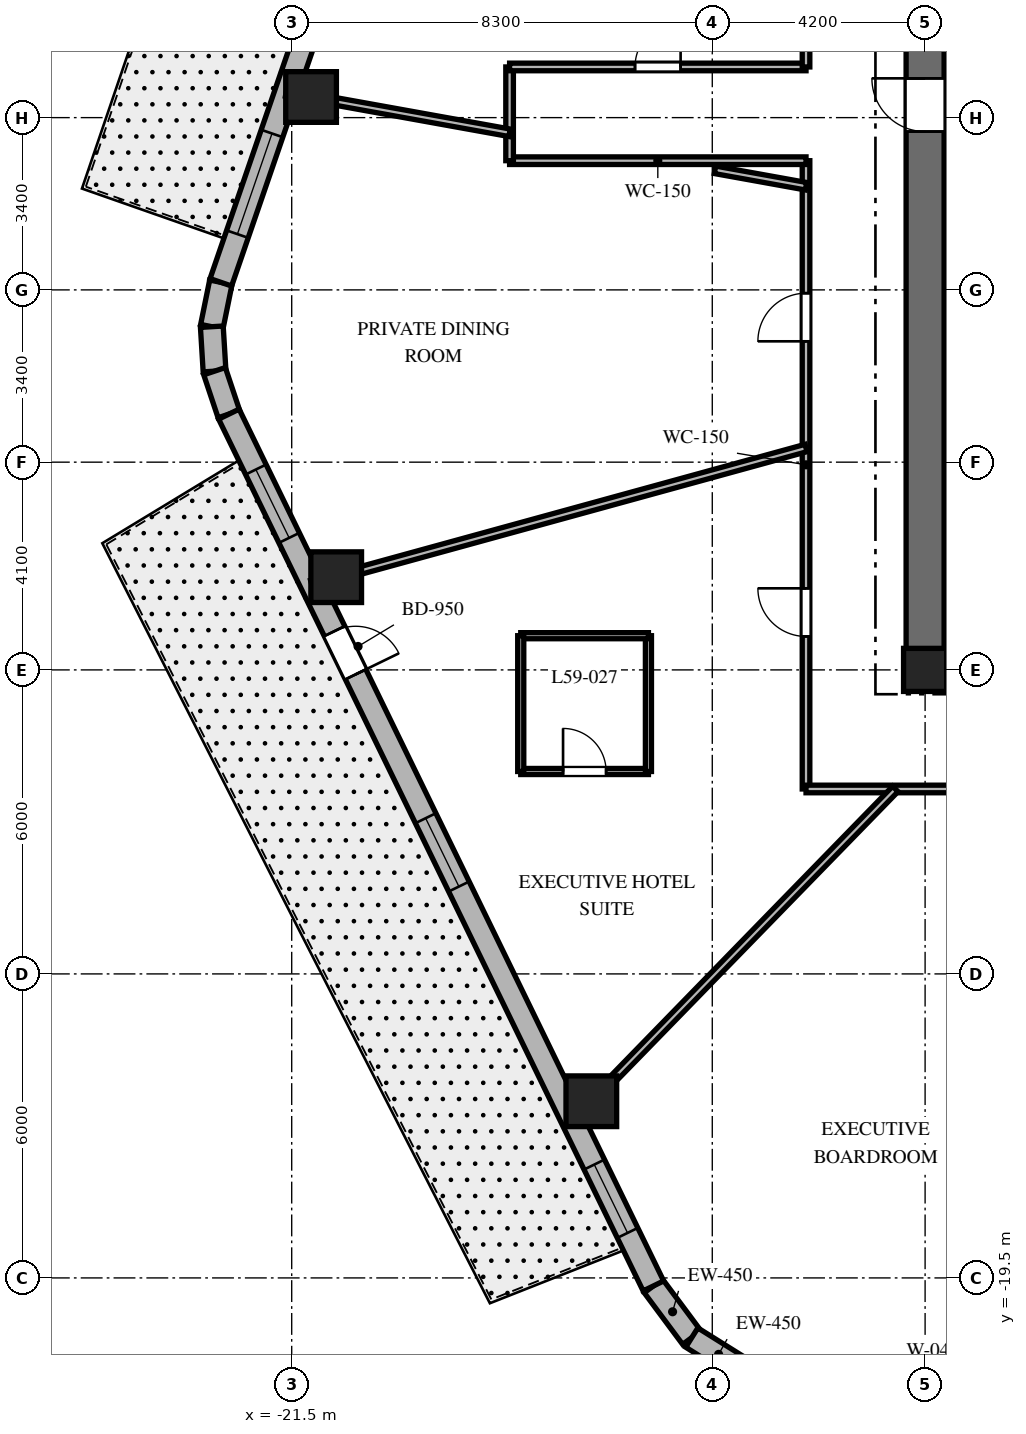
"""IFC4 building model, lengths in metres.
Left out: names, types, materials, properties, quantities, classifications, styles, units other than length and angle.
Written with IfcOpenShell. Run it as: python <this file> out.ifc"""

import sys

from ifc_helpers import new_model, si_unit, direction, frame, frame_2d, origin, origin_2d, place, context, subcontext, project, spatial, rectangle, extrude, element, fill, save


model = new_model("IFC4")
c1 = context("Model", 3, precision=1e-05, world=origin(), true_north=direction((0.0, 1.0)))
c2 = subcontext(c1, "Body", "Model", "MODEL_VIEW")
j1 = project(units=[si_unit("LENGTHUNIT", "METRE"), si_unit("PLANEANGLEUNIT", "RADIAN")], contexts=[c1])
p1 = place(None, origin())
s1 = spatial("IfcSite", under=j1, at=p1, CompositionType="ELEMENT")
p2 = place(p1, origin())
s2 = spatial("IfcBuilding", under=s1, at=p2, CompositionType="ELEMENT")
p3 = place(p2, frame((0.0, 0.0, 236.9)))
s3 = spatial("IfcBuildingStorey", under=s2, at=p3, CompositionType="ELEMENT", Elevation=236.9)
p4 = place(p3, frame((-9.375, -7.5, 0.0), z_axis=(0.0, 0.0, 1.0), x_axis=(1.0, 0.0, 0.0)))
e1 = element("IfcWall", 1, at=p4, inside=s3, PredefinedType="SHEAR", context=c2, shape_type="SweptSolid", body=[
    extrude(rectangle(XDim=18.75, YDim=0.75, at=frame_2d((9.375, 0.0))), origin(), (0.0, 0.0, 1.0), 3.8),
])
p5 = place(p4, frame((9.425, 0.0, 0.0)))
e2 = element("IfcOpeningElement", 2, at=p5, cuts=e1, PredefinedType="OPENING", context=c2, shape_type="SweptSolid", body=[
    extrude(rectangle(XDim=1.0, YDim=2.15, at=frame_2d((0.5, 1.075))), frame((0.0, 0.385, 0.0), z_axis=(0.0, -1.0, 0.0), x_axis=(1.0, 0.0, 0.0)), (0.0, 0.0, 1.0), 0.77),
])
p6 = place(p3, frame((-9.0, -7.125, 0.0), z_axis=(0.0, 0.0, 1.0), x_axis=(0.0, 1.0, 0.0)))
e3 = element("IfcWall", 3, at=p6, inside=s3, PredefinedType="SHEAR", context=c2, shape_type="SweptSolid", body=[
    extrude(rectangle(XDim=14.25, YDim=0.75, at=frame_2d((7.125, 0.0))), origin(), (0.0, 0.0, 1.0), 3.8),
])
p7 = place(p6, frame((10.25, 0.0, 0.0)))
e4 = element("IfcOpeningElement", 4, at=p7, cuts=e3, PredefinedType="OPENING", context=c2, shape_type="SweptSolid", body=[
    extrude(rectangle(XDim=1.05, YDim=2.15, at=frame_2d((0.525, 1.075))), frame((0.0, 0.385, 0.0), z_axis=(0.0, -1.0, 0.0), x_axis=(1.0, 0.0, 0.0)), (0.0, 0.0, 1.0), 0.77),
])
p8 = place(p3, frame((-9.0, -7.5, 0.0), z_axis=(0.0, 0.0, 1.0), x_axis=(1.0, 0.0, 0.0)))
e5 = element("IfcColumn", 5, at=p8, inside=s3, PredefinedType="COLUMN", context=c2, shape_type="SweptSolid", body=[
    extrude(rectangle(XDim=0.85, YDim=0.85, at=origin_2d()), origin(), (0.0, 0.0, 1.0), 3.8),
])
for number, where, z_axis, x_axis in (
    (6, (-21.118, 3.807, 0.0), (0.0, 0.0, 1.0), (1.0, 0.0, 0.0)),
    (7, (-20.622, -5.67, 0.0), (0.0, 0.0, 1.0), (1.0, 0.0, 0.0)),
    (8, (-15.587, -16.013, 0.0), (0.0, 0.0, 1.0), (1.0, 0.0, 0.0)),
):
    element("IfcColumn", number, at=place(p3, frame(where, z_axis=z_axis, x_axis=x_axis)), inside=s3, PredefinedType="COLUMN", context=c2, shape_type="SweptSolid", body=[
        extrude(rectangle(XDim=1.0, YDim=1.0, at=origin_2d()), origin(), (0.0, 0.0, 1.0), 3.8),
    ])
p9 = place(p3, frame((-14.362, -19.658, 0.0), z_axis=(0.0, 0.0, 1.0), x_axis=(0.596642462792, -0.80250717853, 0.0)))
e9 = element("IfcWall", 9, at=p9, inside=s3, PredefinedType="SOLIDWALL", context=c2, shape_type="SweptSolid", body=[
    extrude(rectangle(XDim=1.27, YDim=0.45, at=frame_2d((0.635, 0.0))), origin(), (0.0, 0.0, 1.0), 3.5),
])
p10 = place(p3, frame((-13.604, -20.678, 0.0), z_axis=(0.0, 0.0, 1.0), x_axis=(0.847910404124, -0.53013955387, 0.0)))
e10 = element("IfcWall", 10, at=p10, inside=s3, PredefinedType="SOLIDWALL", context=c2, shape_type="SweptSolid", body=[
    extrude(rectangle(XDim=1.249, YDim=0.45, at=frame_2d((0.624, 0.0))), origin(), (0.0, 0.0, 1.0), 3.5),
])
p11 = place(p3, frame((-22.898, 0.15, 0.0), z_axis=(0.0, 0.0, 1.0), x_axis=(-0.199055826889, -0.979988151858, 0.0)))
e11 = element("IfcWall", 11, at=p11, inside=s3, PredefinedType="SOLIDWALL", context=c2, shape_type="SweptSolid", body=[
    extrude(rectangle(XDim=0.894, YDim=0.45, at=frame_2d((0.447, 0.0))), origin(), (0.0, 0.0, 1.0), 3.5),
])
p12 = place(p3, frame((-23.076, -0.727, 0.0), z_axis=(0.0, 0.0, 1.0), x_axis=(0.060805222108, -0.998149650586, 0.0)))
e12 = element("IfcWall", 12, at=p12, inside=s3, PredefinedType="SOLIDWALL", context=c2, shape_type="SweptSolid", body=[
    extrude(rectangle(XDim=0.879, YDim=0.45, at=frame_2d((0.44, 0.0))), origin(), (0.0, 0.0, 1.0), 3.5),
])
p13 = place(p3, frame((-23.023, -1.604, 0.0), z_axis=(0.0, 0.0, 1.0), x_axis=(0.316801227695, -0.948491951537, 0.0)))
e13 = element("IfcWall", 13, at=p13, inside=s3, PredefinedType="SOLIDWALL", context=c2, shape_type="SweptSolid", body=[
    extrude(rectangle(XDim=0.894, YDim=0.45, at=frame_2d((0.447, 0.0))), origin(), (0.0, 0.0, 1.0), 3.5),
])
p14 = place(p3, frame((-16.324, 19.275, 0.0), z_axis=(0.0, 0.0, 1.0), x_axis=(-0.325083142304, -0.945685439557, 0.0)))
e14 = element("IfcWall", 14, at=p14, inside=s3, PredefinedType="SOLIDWALL", context=c2, shape_type="SweptSolid", body=[
    extrude(rectangle(XDim=20.224, YDim=0.45, at=frame_2d((10.112, 0.0))), origin(), (0.0, 0.0, 1.0), 3.5),
])
p15 = place(p14, frame((5.062, 0.0, 0.0)))
e15 = element("IfcOpeningElement", 15, at=p15, cuts=e14, PredefinedType="OPENING", context=c2, shape_type="SweptSolid", body=[
    extrude(rectangle(XDim=1.0, YDim=2.15, at=frame_2d((0.5, 1.075))), frame((0.0, 0.235, 0.0), z_axis=(0.0, -1.0, 0.0), x_axis=(1.0, 0.0, 0.0)), (0.0, 0.0, 1.0), 0.47),
])
p16 = place(p14, frame((0.953, 0.0, 0.8)))
e16 = element("IfcOpeningElement", 16, at=p16, cuts=e14, PredefinedType="OPENING", context=c2, shape_type="SweptSolid", body=[
    extrude(rectangle(XDim=2.1, YDim=1.85, at=frame_2d((1.05, 0.925))), frame((0.0, 0.235, 0.0), z_axis=(0.0, -1.0, 0.0), x_axis=(1.0, 0.0, 0.0)), (0.0, 0.0, 1.0), 0.47),
])
p17 = place(p14, frame((6.604, 0.0, 0.8)))
e17 = element("IfcOpeningElement", 17, at=p17, cuts=e14, PredefinedType="OPENING", context=c2, shape_type="SweptSolid", body=[
    extrude(rectangle(XDim=2.1, YDim=1.85, at=frame_2d((1.05, 0.925))), frame((0.0, 0.235, 0.0), z_axis=(0.0, -1.0, 0.0), x_axis=(1.0, 0.0, 0.0)), (0.0, 0.0, 1.0), 0.47),
])
p18 = place(p14, frame((11.585, 0.0, 0.8)))
e18 = element("IfcOpeningElement", 18, at=p18, cuts=e14, PredefinedType="OPENING", context=c2, shape_type="SweptSolid", body=[
    extrude(rectangle(XDim=2.1, YDim=1.85, at=frame_2d((1.05, 0.925))), frame((0.0, 0.235, 0.0), z_axis=(0.0, -1.0, 0.0), x_axis=(1.0, 0.0, 0.0)), (0.0, 0.0, 1.0), 0.47),
])
p19 = place(p14, frame((17.118, 0.0, 0.8)))
e19 = element("IfcOpeningElement", 19, at=p19, cuts=e14, PredefinedType="OPENING", context=c2, shape_type="SweptSolid", body=[
    extrude(rectangle(XDim=2.1, YDim=1.85, at=frame_2d((1.05, 0.925))), frame((0.0, 0.235, 0.0), z_axis=(0.0, -1.0, 0.0), x_axis=(1.0, 0.0, 0.0)), (0.0, 0.0, 1.0), 0.47),
])
p20 = place(p3, frame((-22.74, -2.452, 0.0), z_axis=(0.0, 0.0, 1.0), x_axis=(0.437753424814, -0.899095066755, 0.0)))
e20 = element("IfcWall", 20, at=p20, inside=s3, PredefinedType="SOLIDWALL", context=c2, shape_type="SweptSolid", body=[
    extrude(rectangle(XDim=19.137, YDim=0.45, at=frame_2d((9.569, 0.0))), origin(), (0.0, 0.0, 1.0), 3.5),
])
p21 = place(p20, frame((4.763, 0.0, 0.0)))
e21 = element("IfcOpeningElement", 21, at=p21, cuts=e20, PredefinedType="OPENING", context=c2, shape_type="SweptSolid", body=[
    extrude(rectangle(XDim=0.95, YDim=2.15, at=frame_2d((0.475, 1.075))), frame((0.0, 0.235, 0.0), z_axis=(0.0, -1.0, 0.0), x_axis=(1.0, 0.0, 0.0)), (0.0, 0.0, 1.0), 0.47),
])
p22 = place(p20, frame((1.216, 0.0, 0.8)))
e22 = element("IfcOpeningElement", 22, at=p22, cuts=e20, PredefinedType="OPENING", context=c2, shape_type="SweptSolid", body=[
    extrude(rectangle(XDim=1.5, YDim=1.8, at=frame_2d((0.75, 0.9))), frame((0.0, 0.235, 0.0), z_axis=(0.0, -1.0, 0.0), x_axis=(1.0, 0.0, 0.0)), (0.0, 0.0, 1.0), 0.47),
])
p23 = place(p20, frame((8.87, 0.0, 0.8)))
e23 = element("IfcOpeningElement", 23, at=p23, cuts=e20, PredefinedType="OPENING", context=c2, shape_type="SweptSolid", body=[
    extrude(rectangle(XDim=1.5, YDim=1.8, at=frame_2d((0.75, 0.9))), frame((0.0, 0.235, 0.0), z_axis=(0.0, -1.0, 0.0), x_axis=(1.0, 0.0, 0.0)), (0.0, 0.0, 1.0), 0.47),
])
p24 = place(p20, frame((16.473, 0.0, 0.8)))
e24 = element("IfcOpeningElement", 24, at=p24, cuts=e20, PredefinedType="OPENING", context=c2, shape_type="SweptSolid", body=[
    extrude(rectangle(XDim=1.5, YDim=1.8, at=frame_2d((0.75, 0.9))), frame((0.0, 0.235, 0.0), z_axis=(0.0, -1.0, 0.0), x_axis=(1.0, 0.0, 0.0)), (0.0, 0.0, 1.0), 0.47),
])
p25 = place(p3, frame((-11.35, -9.85, 0.0), z_axis=(0.0, 0.0, 1.0), x_axis=(0.0, 1.0, 0.0)))
e25 = element("IfcWall", 25, at=p25, inside=s3, PredefinedType="PARTITIONING", context=c2, shape_type="SweptSolid", body=[
    extrude(rectangle(XDim=12.4, YDim=0.15, at=frame_2d((6.2, 0.0))), origin(), (0.0, 0.0, 1.0), 2.99),
])
p26 = place(p25, frame((8.835, 0.0, 0.0)))
e26 = element("IfcOpeningElement", 26, at=p26, cuts=e25, PredefinedType="OPENING", context=c2, shape_type="SweptSolid", body=[
    extrude(rectangle(XDim=0.95, YDim=2.03, at=frame_2d((0.475, 1.015))), frame((0.0, 0.085, 0.0), z_axis=(0.0, -1.0, 0.0), x_axis=(1.0, 0.0, 0.0)), (0.0, 0.0, 1.0), 0.17),
])
p27 = place(p25, frame((3.01, 0.0, 0.0)))
e27 = element("IfcOpeningElement", 27, at=p27, cuts=e25, PredefinedType="OPENING", context=c2, shape_type="SweptSolid", body=[
    extrude(rectangle(XDim=0.95, YDim=2.03, at=frame_2d((0.475, 1.015))), frame((0.0, 0.085, 0.0), z_axis=(0.0, -1.0, 0.0), x_axis=(1.0, 0.0, 0.0)), (0.0, 0.0, 1.0), 0.17),
])
p28 = place(p3, frame((-11.35, 2.55, 0.0), z_axis=(0.0, 0.0, 1.0), x_axis=(-1.0, 0.0, 0.0)))
e28 = element("IfcWall", 28, at=p28, inside=s3, PredefinedType="PARTITIONING", context=c2, shape_type="SweptSolid", body=[
    extrude(rectangle(XDim=5.85, YDim=0.15, at=frame_2d((2.925, 0.0))), origin(), (0.0, 0.0, 1.0), 2.941),
])
p29 = place(p3, frame((-17.2, 2.55, 0.0), z_axis=(0.0, 0.0, 1.0), x_axis=(0.0, 1.0, 0.0)))
e29 = element("IfcWall", 29, at=p29, inside=s3, PredefinedType="PARTITIONING", context=c2, shape_type="SweptSolid", body=[
    extrude(rectangle(XDim=1.85, YDim=0.15, at=frame_2d((0.925, 0.0))), origin(), (0.0, 0.0, 1.0), 2.941),
])
p30 = place(p3, frame((-17.2, 4.4, 0.0), z_axis=(0.0, 0.0, 1.0), x_axis=(1.0, 0.0, 0.0)))
e30 = element("IfcWall", 30, at=p30, inside=s3, PredefinedType="PARTITIONING", context=c2, shape_type="SweptSolid", body=[
    extrude(rectangle(XDim=5.85, YDim=0.15, at=frame_2d((2.925, 0.0))), origin(), (0.0, 0.0, 1.0), 2.941),
])
p31 = place(p30, frame((2.475, 0.0, 0.0)))
e31 = element("IfcOpeningElement", 31, at=p31, cuts=e30, PredefinedType="OPENING", context=c2, shape_type="SweptSolid", body=[
    extrude(rectangle(XDim=0.9, YDim=2.03, at=frame_2d((0.45, 1.015))), frame((0.0, 0.085, 0.0), z_axis=(0.0, -1.0, 0.0), x_axis=(1.0, 0.0, 0.0)), (0.0, 0.0, 1.0), 0.17),
])
p32 = place(p3, frame((-11.35, 4.4, 0.0), z_axis=(0.0, 0.0, 1.0), x_axis=(0.0, 1.0, 0.0)))
e32 = element("IfcWall", 32, at=p32, inside=s3, PredefinedType="PARTITIONING", context=c2, shape_type="SweptSolid", body=[
    extrude(rectangle(XDim=5.45, YDim=0.15, at=frame_2d((2.725, 0.0))), origin(), (0.0, 0.0, 1.0), 2.99),
])
p33 = place(p32, frame((2.955, 0.0, 0.0)))
e33 = element("IfcOpeningElement", 33, at=p33, cuts=e32, PredefinedType="OPENING", context=c2, shape_type="SweptSolid", body=[
    extrude(rectangle(XDim=0.9, YDim=2.03, at=frame_2d((0.45, 1.015))), frame((0.0, 0.085, 0.0), z_axis=(0.0, -1.0, 0.0), x_axis=(1.0, 0.0, 0.0)), (0.0, 0.0, 1.0), 0.17),
])
p34 = place(p3, frame((-0.92, -9.85, 0.0), z_axis=(0.0, 0.0, 1.0), x_axis=(-1.0, 0.0, 0.0)))
e34 = element("IfcWall", 34, at=p34, inside=s3, PredefinedType="PARTITIONING", context=c2, shape_type="SweptSolid", body=[
    extrude(rectangle(XDim=10.43, YDim=0.15, at=frame_2d((5.215, 0.0))), origin(), (0.0, 0.0, 1.0), 2.99),
])
p35 = place(p34, frame((4.949, 0.0, 0.0)))
e35 = element("IfcOpeningElement", 35, at=p35, cuts=e34, PredefinedType="OPENING", context=c2, shape_type="SweptSolid", body=[
    extrude(rectangle(XDim=0.95, YDim=2.03, at=frame_2d((0.475, 1.015))), frame((0.0, 0.085, 0.0), z_axis=(0.0, -1.0, 0.0), x_axis=(1.0, 0.0, 0.0)), (0.0, 0.0, 1.0), 0.17),
])
p36 = place(p3, frame((-11.35, 2.046, 0.0), z_axis=(0.0, 0.0, 1.0), x_axis=(-0.984127783205, 0.177461281195, 0.0)))
e36 = element("IfcWall", 36, at=p36, inside=s3, PredefinedType="PARTITIONING", context=c2, shape_type="SweptSolid", body=[
    extrude(rectangle(XDim=1.826, YDim=0.15, at=frame_2d((0.913, 0.0))), origin(), (0.0, 0.0, 1.0), 3.5),
])
p37 = place(p3, frame((-17.2, 3.101, 0.0), z_axis=(0.0, 0.0, 1.0), x_axis=(-0.98413465883, 0.177423147559, 0.0)))
e37 = element("IfcWall", 37, at=p37, inside=s3, PredefinedType="PARTITIONING", context=c2, shape_type="SweptSolid", body=[
    extrude(rectangle(XDim=4.482, YDim=0.15, at=frame_2d((2.241, 0.0))), origin(), (0.0, 0.0, 1.0), 2.74),
])
p38 = place(p3, frame((-11.35, -3.121, 0.0), z_axis=(0.0, 0.0, 1.0), x_axis=(-0.964212793822, -0.265129568758, 0.0)))
e38 = element("IfcWall", 38, at=p38, inside=s3, PredefinedType="PARTITIONING", context=c2, shape_type="SweptSolid", body=[
    extrude(rectangle(XDim=10.12, YDim=0.15, at=frame_2d((5.06, 0.0))), origin(), (0.0, 0.0, 1.0), 2.74),
])
p39 = place(p3, frame((-9.588, -9.85, 0.0), z_axis=(0.0, 0.0, 1.0), x_axis=(-0.697519469595, -0.716565830567, 0.0)))
e39 = element("IfcWall", 39, at=p39, inside=s3, PredefinedType="PARTITIONING", context=c2, shape_type="SweptSolid", body=[
    extrude(rectangle(XDim=9.126, YDim=0.15, at=frame_2d((4.563, 0.0))), origin(), (0.0, 0.0, 1.0), 2.74),
])
p40 = place(p3, frame((-16.98, -9.505, 0.0), z_axis=(0.0, 0.0, 1.0), x_axis=(1.0, 0.0, 0.0)))
e40 = element("IfcWall", 40, at=p40, inside=s3, PredefinedType="PARTITIONING", context=c2, shape_type="SweptSolid", body=[
    extrude(rectangle(XDim=2.52, YDim=0.12, at=frame_2d((1.26, 0.0))), origin(), (0.0, 0.0, 1.0), 3.027),
])
p41 = place(p40, frame((0.835, 0.0, 0.0)))
e41 = element("IfcOpeningElement", 41, at=p41, cuts=e40, PredefinedType="OPENING", context=c2, shape_type="SweptSolid", body=[
    extrude(rectangle(XDim=0.85, YDim=2.03, at=frame_2d((0.425, 1.015))), frame((0.0, 0.07, 0.0), z_axis=(0.0, -1.0, 0.0), x_axis=(1.0, 0.0, 0.0)), (0.0, 0.0, 1.0), 0.14),
])
p42 = place(p3, frame((-14.46, -9.505, 0.0), z_axis=(0.0, 0.0, 1.0), x_axis=(0.0, 1.0, 0.0)))
e42 = element("IfcWall", 42, at=p42, inside=s3, PredefinedType="PARTITIONING", context=c2, shape_type="SweptSolid", body=[
    extrude(rectangle(XDim=2.68, YDim=0.12, at=frame_2d((1.34, 0.0))), origin(), (0.0, 0.0, 1.0), 3.5),
])
p43 = place(p3, frame((-14.46, -6.825, 0.0), z_axis=(0.0, 0.0, 1.0), x_axis=(-1.0, 0.0, 0.0)))
e43 = element("IfcWall", 43, at=p43, inside=s3, PredefinedType="PARTITIONING", context=c2, shape_type="SweptSolid", body=[
    extrude(rectangle(XDim=2.52, YDim=0.12, at=frame_2d((1.26, 0.0))), origin(), (0.0, 0.0, 1.0), 3.027),
])
p44 = place(p3, frame((-16.98, -6.825, 0.0), z_axis=(0.0, 0.0, 1.0), x_axis=(0.0, -1.0, 0.0)))
e44 = element("IfcWall", 44, at=p44, inside=s3, PredefinedType="PARTITIONING", context=c2, shape_type="SweptSolid", body=[
    extrude(rectangle(XDim=2.68, YDim=0.12, at=frame_2d((1.34, 0.0))), origin(), (0.0, 0.0, 1.0), 3.5),
])
p45 = place(p19, origin())
e45 = element("IfcWindow", 45, at=p45, inside=s3, PartitioningType="SINGLE_PANEL", PredefinedType="WINDOW", context=c2, shape_type="SweptSolid", body=[
    extrude(rectangle(XDim=2.1, YDim=1.85, at=frame_2d((1.05, 0.925))), frame((0.0, 0.03, 0.0), z_axis=(0.0, -1.0, 0.0), x_axis=(1.0, 0.0, 0.0)), (0.0, 0.0, 1.0), 0.06),
])
fill(e19, e45)
p46 = place(p21, origin())
e46 = element("IfcDoor", 46, at=p46, inside=s3, OperationType="SINGLE_SWING_RIGHT", PredefinedType="DOOR", context=c2, shape_type="SweptSolid", body=[
    extrude(rectangle(XDim=0.95, YDim=2.15, at=frame_2d((0.475, 1.075))), frame((0.0, 0.025, 0.0), z_axis=(0.0, -1.0, 0.0), x_axis=(1.0, 0.0, 0.0)), (0.0, 0.0, 1.0), 0.05),
])
fill(e21, e46)
p47 = place(p22, origin())
e47 = element("IfcWindow", 47, at=p47, inside=s3, PartitioningType="SINGLE_PANEL", PredefinedType="WINDOW", context=c2, shape_type="SweptSolid", body=[
    extrude(rectangle(XDim=1.5, YDim=1.8, at=frame_2d((0.75, 0.9))), frame((0.0, 0.03, 0.0), z_axis=(0.0, -1.0, 0.0), x_axis=(1.0, 0.0, 0.0)), (0.0, 0.0, 1.0), 0.06),
])
fill(e22, e47)
p48 = place(p23, origin())
e48 = element("IfcWindow", 48, at=p48, inside=s3, PartitioningType="SINGLE_PANEL", PredefinedType="WINDOW", context=c2, shape_type="SweptSolid", body=[
    extrude(rectangle(XDim=1.5, YDim=1.8, at=frame_2d((0.75, 0.9))), frame((0.0, 0.03, 0.0), z_axis=(0.0, -1.0, 0.0), x_axis=(1.0, 0.0, 0.0)), (0.0, 0.0, 1.0), 0.06),
])
fill(e23, e48)
p49 = place(p24, origin())
e49 = element("IfcWindow", 49, at=p49, inside=s3, PartitioningType="SINGLE_PANEL", PredefinedType="WINDOW", context=c2, shape_type="SweptSolid", body=[
    extrude(rectangle(XDim=1.5, YDim=1.8, at=frame_2d((0.75, 0.9))), frame((0.0, 0.03, 0.0), z_axis=(0.0, -1.0, 0.0), x_axis=(1.0, 0.0, 0.0)), (0.0, 0.0, 1.0), 0.06),
])
fill(e24, e49)
p50 = place(p7, origin())
e50 = element("IfcDoor", 50, at=p50, inside=s3, OperationType="SINGLE_SWING_RIGHT", PredefinedType="DOOR", context=c2, shape_type="SweptSolid", body=[
    extrude(rectangle(XDim=1.05, YDim=2.15, at=frame_2d((0.525, 1.075))), frame((0.0, 0.025, 0.0), z_axis=(0.0, -1.0, 0.0), x_axis=(1.0, 0.0, 0.0)), (0.0, 0.0, 1.0), 0.05),
])
fill(e4, e50)
p51 = place(p31, origin())
e51 = element("IfcDoor", 51, at=p51, inside=s3, OperationType="SINGLE_SWING_RIGHT", PredefinedType="DOOR", context=c2, shape_type="SweptSolid", body=[
    extrude(rectangle(XDim=0.9, YDim=2.03, at=frame_2d((0.45, 1.015))), frame((0.0, 0.025, 0.0), z_axis=(0.0, -1.0, 0.0), x_axis=(1.0, 0.0, 0.0)), (0.0, 0.0, 1.0), 0.05),
])
fill(e31, e51)
p52 = place(p26, origin())
e52 = element("IfcDoor", 52, at=p52, inside=s3, OperationType="SINGLE_SWING_LEFT", PredefinedType="DOOR", context=c2, shape_type="SweptSolid", body=[
    extrude(rectangle(XDim=0.95, YDim=2.03, at=frame_2d((0.475, 1.015))), frame((0.0, 0.025, 0.0), z_axis=(0.0, -1.0, 0.0), x_axis=(1.0, 0.0, 0.0)), (0.0, 0.0, 1.0), 0.05),
])
fill(e26, e52)
p53 = place(p27, origin())
e53 = element("IfcDoor", 53, at=p53, inside=s3, OperationType="SINGLE_SWING_RIGHT", PredefinedType="DOOR", context=c2, shape_type="SweptSolid", body=[
    extrude(rectangle(XDim=0.95, YDim=2.03, at=frame_2d((0.475, 1.015))), frame((0.0, 0.025, 0.0), z_axis=(0.0, -1.0, 0.0), x_axis=(1.0, 0.0, 0.0)), (0.0, 0.0, 1.0), 0.05),
])
fill(e27, e53)
p54 = place(p41, origin())
e54 = element("IfcDoor", 54, at=p54, inside=s3, OperationType="SINGLE_SWING_LEFT", PredefinedType="DOOR", context=c2, shape_type="SweptSolid", body=[
    extrude(rectangle(XDim=0.85, YDim=2.03, at=frame_2d((0.425, 1.015))), frame((0.0, 0.025, 0.0), z_axis=(0.0, -1.0, 0.0), x_axis=(1.0, 0.0, 0.0)), (0.0, 0.0, 1.0), 0.05),
])
fill(e41, e54)
save(model, sys.argv[1])
